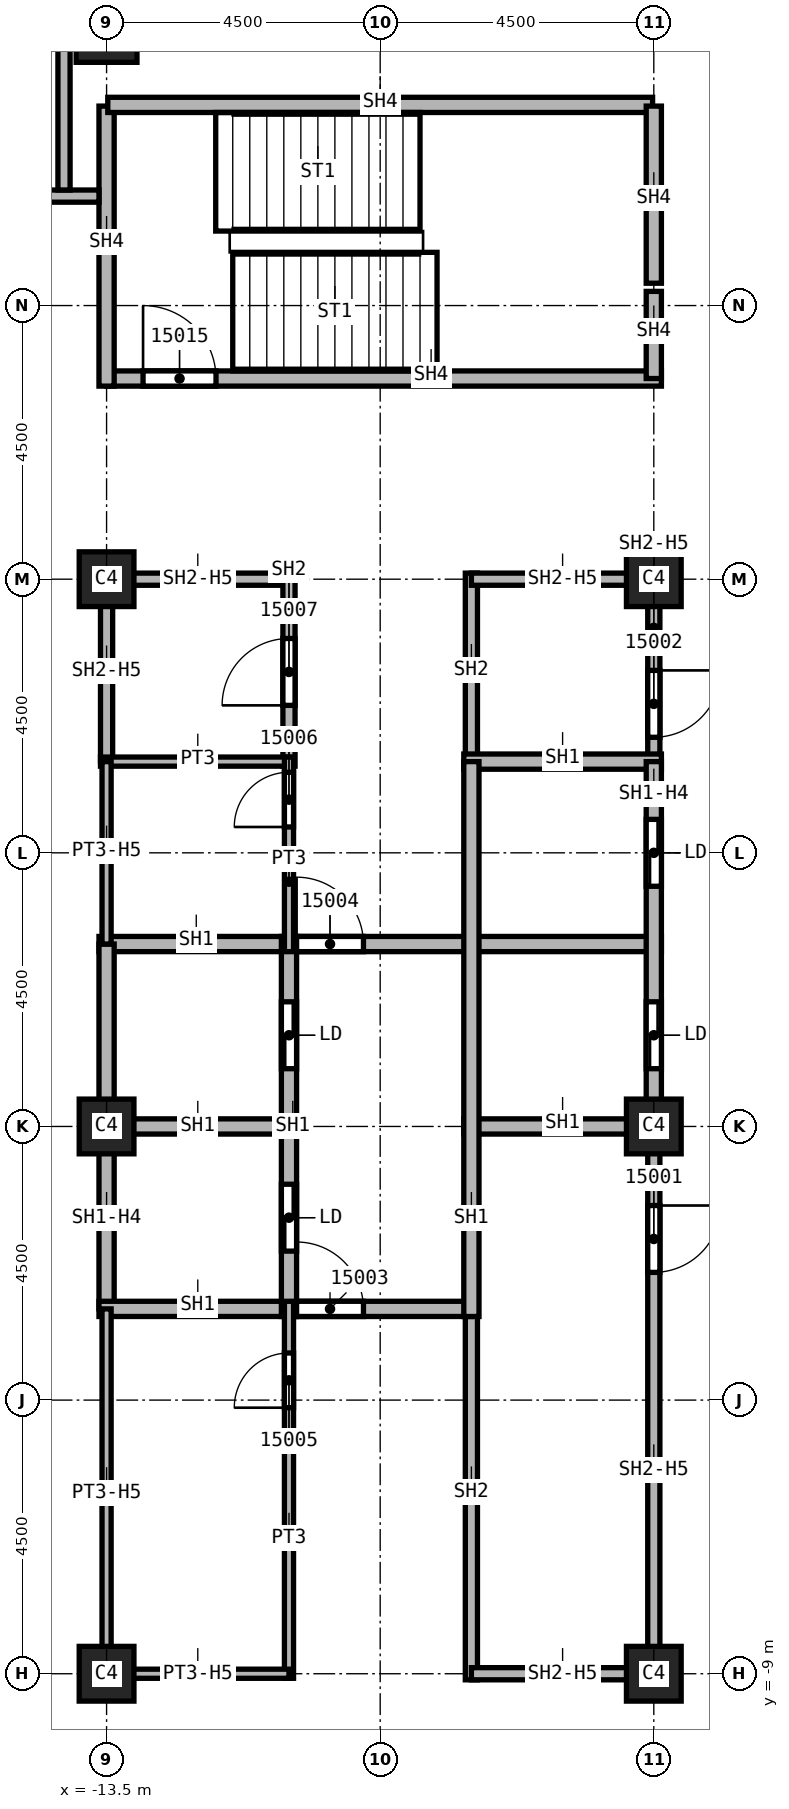
"""IFC4 building model, lengths in metres.
Left out: names, types, materials, properties, quantities, classifications, styles, units other than length and angle.
Written with IfcOpenShell. Run it as: python <this file> out.ifc"""

import sys

from ifc_helpers import new_model, si_unit, direction, frame, frame_2d, origin, origin_2d, place, context, subcontext, project, spatial, rectangle, extrude, element, fill, save


model = new_model("IFC4")
c1 = context("Model", 3, precision=1e-05, world=origin(), true_north=direction((0.0, 1.0)))
c2 = subcontext(c1, "Body", "Model", "MODEL_VIEW")
j1 = project(units=[si_unit("LENGTHUNIT", "METRE"), si_unit("PLANEANGLEUNIT", "RADIAN")], contexts=[c1])
p1 = place(None, origin())
s1 = spatial("IfcSite", under=j1, at=p1, CompositionType="ELEMENT")
p2 = place(p1, origin())
s2 = spatial("IfcBuilding", under=s1, at=p2, CompositionType="ELEMENT")
p3 = place(p2, frame((0.0, 0.0, 232.0)))
s3 = spatial("IfcBuildingStorey", under=s2, at=p3, CompositionType="ELEMENT", Elevation=232.0)
p4 = place(p3, frame((-13.5, 18.0, 0.0), z_axis=(0.0, 0.0, 1.0), x_axis=(1.0, 0.0, 0.0)))
e1 = element("IfcColumn", 1, at=p4, inside=s3, PredefinedType="COLUMN", context=c2, shape_type="SweptSolid", body=[
    extrude(rectangle(XDim=1.0, YDim=1.0, at=origin_2d()), origin(), (0.0, 0.0, 1.0), 3.6),
])
for number, where, z_axis, x_axis in (
    (2, (-4.5, 0.0, 0.0), (0.0, 0.0, 1.0), (1.0, 0.0, 0.0)),
    (3, (-4.5, 9.0, 0.0), (0.0, 0.0, 1.0), (1.0, 0.0, 0.0)),
    (4, (-4.5, -9.0, 0.0), (0.0, 0.0, 1.0), (1.0, 0.0, 0.0)),
    (5, (-13.5, 0.0, 0.0), (0.0, 0.0, 1.0), (1.0, 0.0, 0.0)),
    (6, (-13.5, 9.0, 0.0), (0.0, 0.0, 1.0), (1.0, 0.0, 0.0)),
    (7, (-13.5, -9.0, 0.0), (0.0, 0.0, 1.0), (1.0, 0.0, 0.0)),
):
    element("IfcColumn", number, at=place(p3, frame(where, z_axis=z_axis, x_axis=x_axis)), inside=s3, PredefinedType="COLUMN", context=c2, shape_type="SweptSolid", body=[
        extrude(rectangle(XDim=0.9, YDim=0.9, at=origin_2d()), origin(), (0.0, 0.0, 1.0), 3.6),
    ])
p5 = place(p3, frame((-13.5, 6.0, 0.0), z_axis=(0.0, 0.0, 1.0), x_axis=(0.0, 1.0, 0.0)))
e8 = element("IfcWall", 8, at=p5, inside=s3, PredefinedType="SOLIDWALL", context=c2, shape_type="SweptSolid", body=[
    extrude(rectangle(XDim=3.1, YDim=0.2, at=frame_2d((1.55, 0.0))), origin(), (0.0, 0.0, 1.0), 2.838),
])
p6 = place(p3, frame((-13.5, 9.0, 0.0), z_axis=(0.0, 0.0, 1.0), x_axis=(1.0, 0.0, 0.0)))
e9 = element("IfcWall", 9, at=p6, inside=s3, PredefinedType="SOLIDWALL", context=c2, shape_type="SweptSolid", body=[
    extrude(rectangle(XDim=3.0, YDim=0.2, at=frame_2d((1.5, 0.0))), origin(), (0.0, 0.0, 1.0), 2.838),
])
p7 = place(p3, frame((-10.5, 5.925, 0.0), z_axis=(0.0, 0.0, 1.0), x_axis=(0.0, 1.0, 0.0)))
e10 = element("IfcWall", 10, at=p7, inside=s3, PredefinedType="SOLIDWALL", context=c2, shape_type="SweptSolid", body=[
    extrude(rectangle(XDim=3.175, YDim=0.2, at=frame_2d((1.587, 0.0))), origin(), (0.0, 0.0, 1.0), 3.6),
])
p8 = place(p7, frame((1.0, 0.0, 0.0)))
e11 = element("IfcOpeningElement", 11, at=p8, cuts=e10, PredefinedType="OPENING", context=c2, shape_type="SweptSolid", body=[
    extrude(rectangle(XDim=1.1, YDim=2.1, at=frame_2d((0.55, 1.05))), frame((0.0, 0.1, 0.0), z_axis=(0.0, -1.0, 0.0), x_axis=(1.0, 0.0, 0.0)), (0.0, 0.0, 1.0), 0.2),
])
p9 = place(p3, frame((-7.5, -9.1, 0.0), z_axis=(0.0, 0.0, 1.0), x_axis=(0.0, 1.0, 0.0)))
e12 = element("IfcWall", 12, at=p9, inside=s3, PredefinedType="SOLIDWALL", context=c2, shape_type="SweptSolid", body=[
    extrude(rectangle(XDim=6.225, YDim=0.2, at=frame_2d((3.113, 0.0))), origin(), (0.0, 0.0, 1.0), 3.6),
])
p10 = place(p3, frame((-7.5, 6.0, 0.0), z_axis=(0.0, 0.0, 1.0), x_axis=(0.0, 1.0, 0.0)))
e13 = element("IfcWall", 13, at=p10, inside=s3, PredefinedType="SOLIDWALL", context=c2, shape_type="SweptSolid", body=[
    extrude(rectangle(XDim=3.1, YDim=0.2, at=frame_2d((1.55, 0.0))), origin(), (0.0, 0.0, 1.0), 3.6),
])
for number, where, z_axis, x_axis in (
    (14, (-7.5, 9.0, 0.0), (0.0, 0.0, 1.0), (1.0, 0.0, 0.0)),
    (15, (-4.5, -9.0, 0.0), (0.0, 0.0, 1.0), (-1.0, 0.0, 0.0)),
):
    element("IfcWall", number, at=place(p3, frame(where, z_axis=z_axis, x_axis=x_axis)), inside=s3, PredefinedType="SOLIDWALL", context=c2, shape_type="SweptSolid", body=[
        extrude(rectangle(XDim=3.0, YDim=0.2, at=frame_2d((1.5, 0.0))), origin(), (0.0, 0.0, 1.0), 2.838),
    ])
p11 = place(p3, frame((-4.5, 0.0, 0.0), z_axis=(0.0, 0.0, 1.0), x_axis=(0.0, -1.0, 0.0)))
e16 = element("IfcWall", 16, at=p11, inside=s3, PredefinedType="SOLIDWALL", context=c2, shape_type="SweptSolid", body=[
    extrude(rectangle(XDim=9.1, YDim=0.2, at=frame_2d((4.55, 0.0))), origin(), (0.0, 0.0, 1.0), 2.838),
])
p12 = place(p11, frame((1.3, 0.0, 0.0)))
e17 = element("IfcOpeningElement", 17, at=p12, cuts=e16, PredefinedType="OPENING", context=c2, shape_type="SweptSolid", body=[
    extrude(rectangle(XDim=1.1, YDim=2.1, at=frame_2d((0.55, 1.05))), frame((0.0, 0.1, 0.0), z_axis=(0.0, -1.0, 0.0), x_axis=(1.0, 0.0, 0.0)), (0.0, 0.0, 1.0), 0.2),
])
p13 = place(p3, frame((-4.5, 9.1, 0.0), z_axis=(0.0, 0.0, 1.0), x_axis=(0.0, -1.0, 0.0)))
e18 = element("IfcWall", 18, at=p13, inside=s3, PredefinedType="SOLIDWALL", context=c2, shape_type="SweptSolid", body=[
    extrude(rectangle(XDim=3.1, YDim=0.2, at=frame_2d((1.55, 0.0))), origin(), (0.0, 0.0, 1.0), 2.838),
])
p14 = place(p13, frame((1.6, 0.0, 0.0)))
e19 = element("IfcOpeningElement", 19, at=p14, cuts=e18, PredefinedType="OPENING", context=c2, shape_type="SweptSolid", body=[
    extrude(rectangle(XDim=1.1, YDim=2.1, at=frame_2d((0.55, 1.05))), frame((0.0, 0.1, 0.0), z_axis=(0.0, -1.0, 0.0), x_axis=(1.0, 0.0, 0.0)), (0.0, 0.0, 1.0), 0.2),
])
p15 = place(p3, frame((-13.625, 0.0, 0.0), z_axis=(0.0, 0.0, 1.0), x_axis=(1.0, 0.0, 0.0)))
e20 = element("IfcWall", 20, at=p15, inside=s3, PredefinedType="SOLIDWALL", context=c2, shape_type="SweptSolid", body=[
    extrude(rectangle(XDim=3.125, YDim=0.25, at=frame_2d((1.562, 0.0))), origin(), (0.0, 0.0, 1.0), 3.6),
])
p16 = place(p3, frame((-13.625, 3.0, 0.0), z_axis=(0.0, 0.0, 1.0), x_axis=(1.0, 0.0, 0.0)))
e21 = element("IfcWall", 21, at=p16, inside=s3, PredefinedType="SOLIDWALL", context=c2, shape_type="SweptSolid", body=[
    extrude(rectangle(XDim=9.25, YDim=0.25, at=frame_2d((4.625, 0.0))), origin(), (0.0, 0.0, 1.0), 3.6),
])
p17 = place(p16, frame((3.25, 0.0, 0.0)))
e22 = element("IfcOpeningElement", 22, at=p17, cuts=e21, PredefinedType="OPENING", context=c2, shape_type="SweptSolid", body=[
    extrude(rectangle(XDim=1.1, YDim=2.1, at=frame_2d((0.55, 1.05))), frame((0.0, 0.125, 0.0), z_axis=(0.0, -1.0, 0.0), x_axis=(1.0, 0.0, 0.0)), (0.0, 0.0, 1.0), 0.25),
])
p18 = place(p3, frame((-13.5, -3.0, 0.0), z_axis=(0.0, 0.0, 1.0), x_axis=(0.0, 1.0, 0.0)))
e23 = element("IfcWall", 23, at=p18, inside=s3, PredefinedType="SOLIDWALL", context=c2, shape_type="SweptSolid", body=[
    extrude(rectangle(XDim=6.0, YDim=0.25, at=frame_2d((3.0, 0.0))), origin(), (0.0, 0.0, 1.0), 2.838),
])
p19 = place(p3, frame((-13.625, -3.0, 0.0), z_axis=(0.0, 0.0, 1.0), x_axis=(1.0, 0.0, 0.0)))
e24 = element("IfcWall", 24, at=p19, inside=s3, PredefinedType="SOLIDWALL", context=c2, shape_type="SweptSolid", body=[
    extrude(rectangle(XDim=6.125, YDim=0.25, at=frame_2d((3.062, 0.0))), origin(), (0.0, 0.0, 1.0), 3.6),
])
p20 = place(p19, frame((3.25, 0.0, 0.0)))
e25 = element("IfcOpeningElement", 25, at=p20, cuts=e24, PredefinedType="OPENING", context=c2, shape_type="SweptSolid", body=[
    extrude(rectangle(XDim=1.1, YDim=2.1, at=frame_2d((0.55, 1.05))), frame((0.0, 0.125, 0.0), z_axis=(0.0, -1.0, 0.0), x_axis=(1.0, 0.0, 0.0)), (0.0, 0.0, 1.0), 0.25),
])
p21 = place(p3, frame((-10.5, -3.125, 0.0), z_axis=(0.0, 0.0, 1.0), x_axis=(0.0, 1.0, 0.0)))
e26 = element("IfcWall", 26, at=p21, inside=s3, PredefinedType="SOLIDWALL", context=c2, shape_type="SweptSolid", body=[
    extrude(rectangle(XDim=6.25, YDim=0.25, at=frame_2d((3.125, 0.0))), origin(), (0.0, 0.0, 1.0), 3.6),
])
p22 = place(p21, frame((1.075, 0.0, 0.0)))
e27 = element("IfcOpeningElement", 27, at=p22, cuts=e26, PredefinedType="OPENING", context=c2, shape_type="SweptSolid", body=[
    extrude(rectangle(XDim=1.1, YDim=2.1, at=frame_2d((0.55, 1.05))), frame((0.0, 0.125, 0.0), z_axis=(0.0, -1.0, 0.0), x_axis=(1.0, 0.0, 0.0)), (0.0, 0.0, 1.0), 0.25),
])
p23 = place(p21, frame((4.075, 0.0, 0.0)))
e28 = element("IfcOpeningElement", 28, at=p23, cuts=e26, PredefinedType="OPENING", context=c2, shape_type="SweptSolid", body=[
    extrude(rectangle(XDim=1.1, YDim=2.1, at=frame_2d((0.55, 1.05))), frame((0.0, 0.125, 0.0), z_axis=(0.0, -1.0, 0.0), x_axis=(1.0, 0.0, 0.0)), (0.0, 0.0, 1.0), 0.25),
])
for number, where, z_axis, x_axis in (
    (29, (-7.625, 0.0, 0.0), (0.0, 0.0, 1.0), (1.0, 0.0, 0.0)),
    (30, (-7.625, 6.0, 0.0), (0.0, 0.0, 1.0), (1.0, 0.0, 0.0)),
):
    element("IfcWall", number, at=place(p3, frame(where, z_axis=z_axis, x_axis=x_axis)), inside=s3, PredefinedType="SOLIDWALL", context=c2, shape_type="SweptSolid", body=[
        extrude(rectangle(XDim=3.25, YDim=0.25, at=frame_2d((1.625, 0.0))), origin(), (0.0, 0.0, 1.0), 3.6),
    ])
p24 = place(p3, frame((-7.5, -3.125, 0.0), z_axis=(0.0, 0.0, 1.0), x_axis=(0.0, 1.0, 0.0)))
e31 = element("IfcWall", 31, at=p24, inside=s3, PredefinedType="SOLIDWALL", context=c2, shape_type="SweptSolid", body=[
    extrude(rectangle(XDim=9.125, YDim=0.25, at=frame_2d((4.562, 0.0))), origin(), (0.0, 0.0, 1.0), 3.6),
])
p25 = place(p3, frame((-4.5, 6.0, 0.0), z_axis=(0.0, 0.0, 1.0), x_axis=(0.0, -1.0, 0.0)))
e32 = element("IfcWall", 32, at=p25, inside=s3, PredefinedType="SOLIDWALL", context=c2, shape_type="SweptSolid", body=[
    extrude(rectangle(XDim=6.0, YDim=0.25, at=frame_2d((3.0, 0.0))), origin(), (0.0, 0.0, 1.0), 2.838),
])
p26 = place(p25, frame((3.95, 0.0, 0.0)))
e33 = element("IfcOpeningElement", 33, at=p26, cuts=e32, PredefinedType="OPENING", context=c2, shape_type="SweptSolid", body=[
    extrude(rectangle(XDim=1.1, YDim=2.1, at=frame_2d((0.55, 1.05))), frame((0.0, 0.125, 0.0), z_axis=(0.0, -1.0, 0.0), x_axis=(1.0, 0.0, 0.0)), (0.0, 0.0, 1.0), 0.25),
])
p27 = place(p25, frame((0.95, 0.0, 0.0)))
e34 = element("IfcOpeningElement", 34, at=p27, cuts=e32, PredefinedType="OPENING", context=c2, shape_type="SweptSolid", body=[
    extrude(rectangle(XDim=1.1, YDim=2.1, at=frame_2d((0.55, 1.05))), frame((0.0, 0.125, 0.0), z_axis=(0.0, -1.0, 0.0), x_axis=(1.0, 0.0, 0.0)), (0.0, 0.0, 1.0), 0.25),
])
p28 = place(p3, frame((-13.5, 12.3, 0.0), z_axis=(0.0, 0.0, 1.0), x_axis=(1.0, 0.0, 0.0)))
e35 = element("IfcWall", 35, at=p28, inside=s3, PredefinedType="SOLIDWALL", context=c2, shape_type="SweptSolid", body=[
    extrude(rectangle(XDim=9.125, YDim=0.25, at=frame_2d((4.562, 0.0))), origin(), (0.0, 0.0, 1.0), 3.6),
])
p29 = place(p28, frame((0.6, 0.0, 0.0)))
e36 = element("IfcOpeningElement", 36, at=p29, cuts=e35, PredefinedType="OPENING", context=c2, shape_type="SweptSolid", body=[
    extrude(rectangle(XDim=1.2, YDim=2.1, at=frame_2d((0.6, 1.05))), frame((0.0, 0.125, 0.0), z_axis=(0.0, -1.0, 0.0), x_axis=(1.0, 0.0, 0.0)), (0.0, 0.0, 1.0), 0.25),
])
p30 = place(p3, frame((-13.5, 16.78, 0.0), z_axis=(0.0, 0.0, 1.0), x_axis=(0.0, -1.0, 0.0)))
e37 = element("IfcWall", 37, at=p30, inside=s3, PredefinedType="SOLIDWALL", context=c2, shape_type="SweptSolid", body=[
    extrude(rectangle(XDim=4.605, YDim=0.25, at=frame_2d((2.302, 0.0))), origin(), (0.0, 0.0, 1.0), 3.6),
])
p31 = place(p3, frame((-13.48, 16.8, 0.0), z_axis=(0.0, 0.0, 1.0), x_axis=(1.0, 0.0, 0.0)))
e38 = element("IfcWall", 38, at=p31, inside=s3, PredefinedType="SOLIDWALL", context=c2, shape_type="SweptSolid", body=[
    extrude(rectangle(XDim=8.96, YDim=0.25, at=frame_2d((4.48, 0.0))), origin(), (0.0, 0.0, 1.0), 3.6),
])
p32 = place(p3, frame((-4.5, 13.733, 0.0), z_axis=(0.0, 0.0, 1.0), x_axis=(0.0, -1.0, 0.0)))
e39 = element("IfcWall", 39, at=p32, inside=s3, PredefinedType="SOLIDWALL", context=c2, shape_type="SweptSolid", body=[
    extrude(rectangle(XDim=1.433, YDim=0.25, at=frame_2d((0.716, 0.0))), origin(), (0.0, 0.0, 1.0), 3.6),
])
p33 = place(p3, frame((-4.5, 16.78, 0.0), z_axis=(0.0, 0.0, 1.0), x_axis=(0.0, -1.0, 0.0)))
e40 = element("IfcWall", 40, at=p33, inside=s3, PredefinedType="SOLIDWALL", context=c2, shape_type="SweptSolid", body=[
    extrude(rectangle(XDim=2.913, YDim=0.25, at=frame_2d((1.457, 0.0))), origin(), (0.0, 0.0, 1.0), 3.6),
])
p34 = place(p3, frame((-13.6, 6.0, 0.0), z_axis=(0.0, 0.0, 1.0), x_axis=(1.0, 0.0, 0.0)))
e41 = element("IfcWall", 41, at=p34, inside=s3, PredefinedType="PARTITIONING", context=c2, shape_type="SweptSolid", body=[
    extrude(rectangle(XDim=3.1, YDim=0.15, at=frame_2d((1.55, 0.0))), origin(), (0.0, 0.0, 1.0), 3.6),
])
p35 = place(p3, frame((-13.5, -9.075, 0.0), z_axis=(0.0, 0.0, 1.0), x_axis=(0.0, 1.0, 0.0)))
e42 = element("IfcWall", 42, at=p35, inside=s3, PredefinedType="PARTITIONING", context=c2, shape_type="SweptSolid", body=[
    extrude(rectangle(XDim=6.075, YDim=0.15, at=frame_2d((3.038, 0.0))), origin(), (0.0, 0.0, 1.0), 2.838),
])
p36 = place(p3, frame((-13.5, 3.0, 0.0), z_axis=(0.0, 0.0, 1.0), x_axis=(0.0, 1.0, 0.0)))
e43 = element("IfcWall", 43, at=p36, inside=s3, PredefinedType="PARTITIONING", context=c2, shape_type="SweptSolid", body=[
    extrude(rectangle(XDim=3.0, YDim=0.15, at=frame_2d((1.5, 0.0))), origin(), (0.0, 0.0, 1.0), 2.838),
])
p37 = place(p3, frame((-10.5, -9.075, 0.0), z_axis=(0.0, 0.0, 1.0), x_axis=(0.0, 1.0, 0.0)))
e44 = element("IfcWall", 44, at=p37, inside=s3, PredefinedType="PARTITIONING", context=c2, shape_type="SweptSolid", body=[
    extrude(rectangle(XDim=6.2, YDim=0.15, at=frame_2d((3.1, 0.0))), origin(), (0.0, 0.0, 1.0), 3.6),
])
p38 = place(p37, frame((4.45, 0.0, 0.0)))
e45 = element("IfcOpeningElement", 45, at=p38, cuts=e44, PredefinedType="OPENING", context=c2, shape_type="SweptSolid", body=[
    extrude(rectangle(XDim=0.9, YDim=2.1, at=frame_2d((0.45, 1.05))), frame((0.0, 0.075, 0.0), z_axis=(0.0, -1.0, 0.0), x_axis=(1.0, 0.0, 0.0)), (0.0, 0.0, 1.0), 0.15),
])
p39 = place(p3, frame((-10.5, -9.0, 0.0), z_axis=(0.0, 0.0, 1.0), x_axis=(-1.0, 0.0, 0.0)))
e46 = element("IfcWall", 46, at=p39, inside=s3, PredefinedType="PARTITIONING", context=c2, shape_type="SweptSolid", body=[
    extrude(rectangle(XDim=3.0, YDim=0.15, at=frame_2d((1.5, 0.0))), origin(), (0.0, 0.0, 1.0), 2.838),
])
p40 = place(p3, frame((-10.5, 2.875, 0.0), z_axis=(0.0, 0.0, 1.0), x_axis=(0.0, 1.0, 0.0)))
e47 = element("IfcWall", 47, at=p40, inside=s3, PredefinedType="PARTITIONING", context=c2, shape_type="SweptSolid", body=[
    extrude(rectangle(XDim=3.2, YDim=0.15, at=frame_2d((1.6, 0.0))), origin(), (0.0, 0.0, 1.0), 3.6),
])
p41 = place(p40, frame((2.05, 0.0, 0.0)))
e48 = element("IfcOpeningElement", 48, at=p41, cuts=e47, PredefinedType="OPENING", context=c2, shape_type="SweptSolid", body=[
    extrude(rectangle(XDim=0.9, YDim=2.1, at=frame_2d((0.45, 1.05))), frame((0.0, 0.075, 0.0), z_axis=(0.0, -1.0, 0.0), x_axis=(1.0, 0.0, 0.0)), (0.0, 0.0, 1.0), 0.15),
])
p42 = place(p3, frame((-21.9, 15.3, 0.0), z_axis=(0.0, 0.0, 1.0), x_axis=(1.0, 0.0, 0.0)))
e49 = element("IfcWall", 49, at=p42, inside=s3, PredefinedType="SOLIDWALL", context=c2, shape_type="SweptSolid", body=[
    extrude(rectangle(XDim=8.275, YDim=0.2, at=frame_2d((4.137, 0.0))), origin(), (0.0, 0.0, 1.0), 3.6),
])
p43 = place(p42, frame((4.8, 0.0, 0.0)))
e50 = element("IfcOpeningElement", 50, at=p43, cuts=e49, PredefinedType="OPENING", context=c2, shape_type="SweptSolid", body=[
    extrude(rectangle(XDim=1.2, YDim=2.1, at=frame_2d((0.6, 1.05))), frame((0.0, 0.1, 0.0), z_axis=(0.0, -1.0, 0.0), x_axis=(1.0, 0.0, 0.0)), (0.0, 0.0, 1.0), 0.2),
])
p44 = place(p3, frame((-14.2, 15.4, 0.0), z_axis=(0.0, 0.0, 1.0), x_axis=(0.0, 1.0, 0.0)))
e51 = element("IfcWall", 51, at=p44, inside=s3, PredefinedType="SOLIDWALL", context=c2, shape_type="SweptSolid", body=[
    extrude(rectangle(XDim=5.9, YDim=0.2, at=frame_2d((2.95, 0.0))), origin(), (0.0, 0.0, 1.0), 3.6),
])
p45 = place(p12, origin())
e52 = element("IfcDoor", 52, at=p45, inside=s3, OperationType="SINGLE_SWING_RIGHT", PredefinedType="DOOR", context=c2, shape_type="SweptSolid", body=[
    extrude(rectangle(XDim=1.1, YDim=2.1, at=frame_2d((0.55, 1.05))), frame((0.0, 0.025, 0.0), z_axis=(0.0, -1.0, 0.0), x_axis=(1.0, 0.0, 0.0)), (0.0, 0.0, 1.0), 0.05),
])
fill(e17, e52)
p46 = place(p14, origin())
e53 = element("IfcDoor", 53, at=p46, inside=s3, OperationType="SINGLE_SWING_LEFT", PredefinedType="DOOR", context=c2, shape_type="SweptSolid", body=[
    extrude(rectangle(XDim=1.1, YDim=2.1, at=frame_2d((0.55, 1.05))), frame((0.0, 0.025, 0.0), z_axis=(0.0, -1.0, 0.0), x_axis=(1.0, 0.0, 0.0)), (0.0, 0.0, 1.0), 0.05),
])
fill(e19, e53)
p47 = place(p20, origin())
e54 = element("IfcDoor", 54, at=p47, inside=s3, OperationType="SINGLE_SWING_RIGHT", PredefinedType="DOOR", context=c2, shape_type="SweptSolid", body=[
    extrude(rectangle(XDim=1.1, YDim=2.1, at=frame_2d((0.55, 1.05))), frame((0.0, 0.025, 0.0), z_axis=(0.0, -1.0, 0.0), x_axis=(1.0, 0.0, 0.0)), (0.0, 0.0, 1.0), 0.05),
])
fill(e25, e54)
p48 = place(p17, origin())
e55 = element("IfcDoor", 55, at=p48, inside=s3, OperationType="SINGLE_SWING_LEFT", PredefinedType="DOOR", context=c2, shape_type="SweptSolid", body=[
    extrude(rectangle(XDim=1.1, YDim=2.1, at=frame_2d((0.55, 1.05))), frame((0.0, 0.025, 0.0), z_axis=(0.0, -1.0, 0.0), x_axis=(1.0, 0.0, 0.0)), (0.0, 0.0, 1.0), 0.05),
])
fill(e22, e55)
p49 = place(p38, origin())
e56 = element("IfcDoor", 56, at=p49, inside=s3, OperationType="SINGLE_SWING_RIGHT", PredefinedType="DOOR", context=c2, shape_type="SweptSolid", body=[
    extrude(rectangle(XDim=0.9, YDim=2.1, at=frame_2d((0.45, 1.05))), frame((0.0, 0.025, 0.0), z_axis=(0.0, -1.0, 0.0), x_axis=(1.0, 0.0, 0.0)), (0.0, 0.0, 1.0), 0.05),
])
fill(e45, e56)
p50 = place(p41, origin())
e57 = element("IfcDoor", 57, at=p50, inside=s3, OperationType="SINGLE_SWING_LEFT", PredefinedType="DOOR", context=c2, shape_type="SweptSolid", body=[
    extrude(rectangle(XDim=0.9, YDim=2.1, at=frame_2d((0.45, 1.05))), frame((0.0, 0.025, 0.0), z_axis=(0.0, -1.0, 0.0), x_axis=(1.0, 0.0, 0.0)), (0.0, 0.0, 1.0), 0.05),
])
fill(e48, e57)
p51 = place(p8, origin())
e58 = element("IfcDoor", 58, at=p51, inside=s3, OperationType="SINGLE_SWING_RIGHT", PredefinedType="DOOR", context=c2, shape_type="SweptSolid", body=[
    extrude(rectangle(XDim=1.1, YDim=2.1, at=frame_2d((0.55, 1.05))), frame((0.0, 0.025, 0.0), z_axis=(0.0, -1.0, 0.0), x_axis=(1.0, 0.0, 0.0)), (0.0, 0.0, 1.0), 0.05),
])
fill(e11, e58)
p52 = place(p29, origin())
e59 = element("IfcDoor", 59, at=p52, inside=s3, OperationType="SINGLE_SWING_RIGHT", PredefinedType="DOOR", context=c2, shape_type="SweptSolid", body=[
    extrude(rectangle(XDim=1.2, YDim=2.1, at=frame_2d((0.6, 1.05))), frame((0.0, 0.025, 0.0), z_axis=(0.0, -1.0, 0.0), x_axis=(1.0, 0.0, 0.0)), (0.0, 0.0, 1.0), 0.05),
])
fill(e36, e59)
p53 = place(p26, origin())
e60 = element("IfcDoor", 60, at=p53, inside=s3, OperationType="SLIDING_TO_LEFT", PredefinedType="DOOR", context=c2, shape_type="SweptSolid", body=[
    extrude(rectangle(XDim=1.1, YDim=2.1, at=frame_2d((0.55, 1.05))), frame((0.0, 0.025, 0.0), z_axis=(0.0, -1.0, 0.0), x_axis=(1.0, 0.0, 0.0)), (0.0, 0.0, 1.0), 0.05),
])
fill(e33, e60)
p54 = place(p27, origin())
e61 = element("IfcDoor", 61, at=p54, inside=s3, OperationType="SLIDING_TO_LEFT", PredefinedType="DOOR", context=c2, shape_type="SweptSolid", body=[
    extrude(rectangle(XDim=1.1, YDim=2.1, at=frame_2d((0.55, 1.05))), frame((0.0, 0.025, 0.0), z_axis=(0.0, -1.0, 0.0), x_axis=(1.0, 0.0, 0.0)), (0.0, 0.0, 1.0), 0.05),
])
fill(e34, e61)
p55 = place(p22, origin())
e62 = element("IfcDoor", 62, at=p55, inside=s3, OperationType="SLIDING_TO_LEFT", PredefinedType="DOOR", context=c2, shape_type="SweptSolid", body=[
    extrude(rectangle(XDim=1.1, YDim=2.1, at=frame_2d((0.55, 1.05))), frame((0.0, 0.025, 0.0), z_axis=(0.0, -1.0, 0.0), x_axis=(1.0, 0.0, 0.0)), (0.0, 0.0, 1.0), 0.05),
])
fill(e27, e62)
p56 = place(p23, origin())
e63 = element("IfcDoor", 63, at=p56, inside=s3, OperationType="SLIDING_TO_LEFT", PredefinedType="DOOR", context=c2, shape_type="SweptSolid", body=[
    extrude(rectangle(XDim=1.1, YDim=2.1, at=frame_2d((0.55, 1.05))), frame((0.0, 0.025, 0.0), z_axis=(0.0, -1.0, 0.0), x_axis=(1.0, 0.0, 0.0)), (0.0, 0.0, 1.0), 0.05),
])
fill(e28, e63)
save(model, sys.argv[1])
